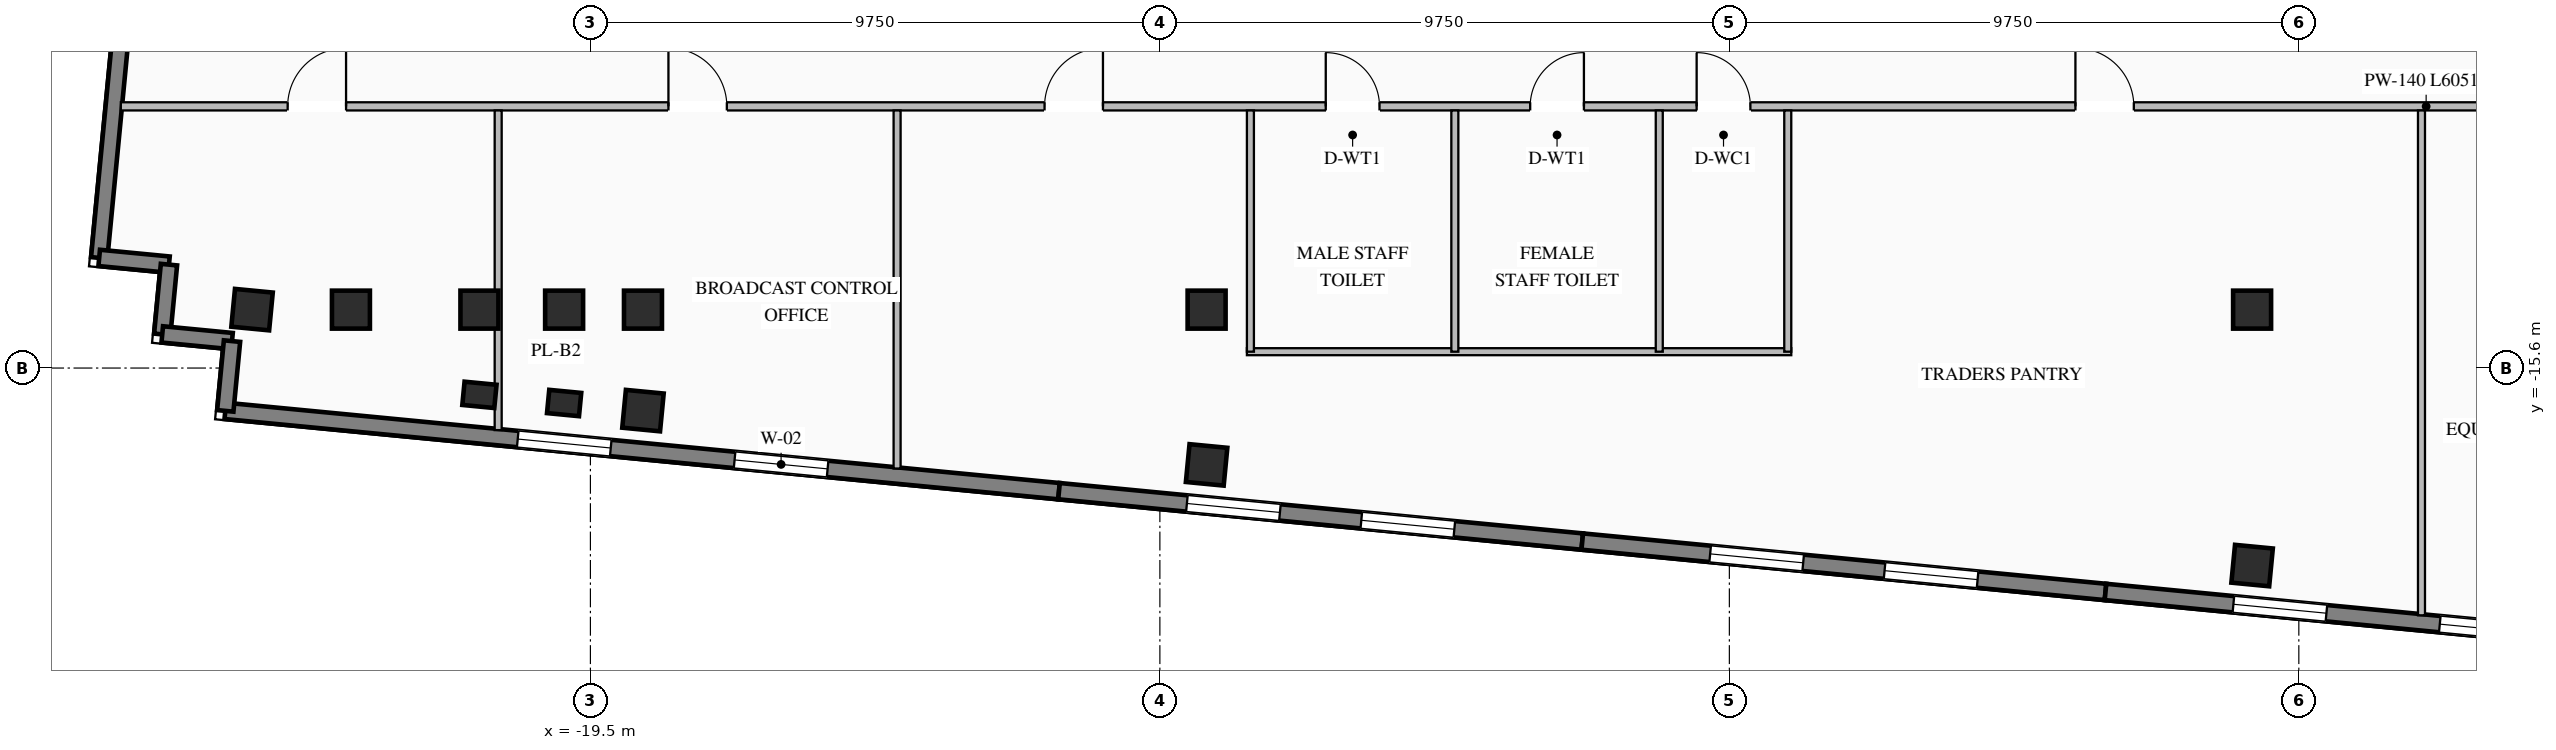
"""IFC4 building model, lengths in metres.
Left out: names, types, materials, properties, quantities, classifications, styles, units other than length and angle.
Written with IfcOpenShell. Run it as: python <this file> out.ifc"""

import sys

from ifc_helpers import new_model, si_unit, direction, frame, frame_2d, origin, origin_2d, place, context, subcontext, project, spatial, rectangle, i_section, extrude, element, fill, save


model = new_model("IFC4")
c1 = context("Model", 3, precision=1e-05, world=origin(), true_north=direction((0.0, 1.0)))
c2 = subcontext(c1, "Body", "Model", "MODEL_VIEW")
j1 = project(units=[si_unit("LENGTHUNIT", "METRE"), si_unit("PLANEANGLEUNIT", "RADIAN")], contexts=[c1])
p1 = place(None, origin())
s1 = spatial("IfcSite", under=j1, at=p1, CompositionType="ELEMENT")
p2 = place(p1, origin())
s2 = spatial("IfcBuilding", under=s1, at=p2, CompositionType="ELEMENT")
p3 = place(p2, frame((0.0, 0.0, 181.1)))
s3 = spatial("IfcBuildingStorey", under=s2, at=p3, CompositionType="ELEMENT", Elevation=181.1)
for number, where, z_axis, x_axis in (
    (1, (-21.4, -14.6, 0.0), (0.0, 0.0, 1.0), (1.0, 0.0, 0.0)),
    (2, (-19.95, -14.6, 0.0), (0.0, 0.0, 1.0), (1.0, 0.0, 0.0)),
    (3, (-18.6, -14.6, 0.0), (0.0, 0.0, 1.0), (1.0, 0.0, 0.0)),
    (4, (-8.95, -14.6, 0.0), (0.0, 0.0, 1.0), (1.0, 0.0, 0.0)),
    (5, (8.95, -14.6, 0.0), (0.0, 0.0, 1.0), (1.0, 0.0, 0.0)),
    (6, (-23.6, -14.6, 0.0), (0.0, 0.0, 1.0), (1.0, 0.0, 0.0)),
    (7, (-18.6, -16.329, 0.0), (0.0, 0.0, 1.0), (0.995, -0.096, 0.0)),
    (8, (-8.95, -17.258, 0.0), (0.0, 0.0, 1.0), (0.995, -0.096, 0.0)),
    (9, (8.95, -18.981, 0.0), (0.0, 0.0, 1.0), (0.995, -0.096, 0.0)),
    (10, (-25.293, -14.6, 0.0), (0.0, 0.0, 1.0), (0.995, -0.096, 0.0)),
):
    element("IfcColumn", number, at=place(p3, frame(where, z_axis=z_axis, x_axis=x_axis)), inside=s3, PredefinedType="COLUMN", context=c2, shape_type="SweptSolid", body=[
        extrude(i_section(OverallWidth=0.65, OverallDepth=0.65, WebThickness=0.028, FlangeThickness=0.04, at=origin_2d()), origin(), (0.0, 0.0, 1.0), 3.45),
    ])
for number, where, z_axis, x_axis in (
    (11, (-21.4, -16.059, 0.0), (0.0, 0.0, 1.0), (0.995, -0.096, 0.0)),
    (12, (-19.95, -16.199, 0.0), (0.0, 0.0, 1.0), (0.995, -0.096, 0.0)),
):
    element("IfcColumn", number, at=place(p3, frame(where, z_axis=z_axis, x_axis=x_axis)), inside=s3, PredefinedType="PILASTER", context=c2, shape_type="SweptSolid", body=[
        extrude(rectangle(XDim=0.55, YDim=0.4, at=origin_2d()), origin(), (0.0, 0.0, 1.0), 3.45),
    ])
p4 = place(p3, frame((-11.477, -17.708, 0.0), z_axis=(0.0, 0.0, 1.0), x_axis=(-0.995395762701, 0.095850276977, 0.0)))
e13 = element("IfcWall", 13, at=p4, inside=s3, PredefinedType="STANDARD", context=c2, shape_type="SweptSolid", body=[
    extrude(rectangle(XDim=14.34, YDim=0.28, at=frame_2d((7.17, 0.0))), origin(), (0.0, 0.0, 1.0), 3.25),
])
p5 = place(p4, frame((3.98, 0.0, 0.76)))
e14 = element("IfcOpeningElement", 14, at=p5, cuts=e13, PredefinedType="OPENING", context=c2, shape_type="SweptSolid", body=[
    extrude(rectangle(XDim=1.6, YDim=1.95, at=frame_2d((0.8, 0.975))), frame((0.0, 0.15, 0.0), z_axis=(0.0, -1.0, 0.0), x_axis=(1.0, 0.0, 0.0)), (0.0, 0.0, 1.0), 0.3),
])
p6 = place(p4, frame((7.71, 0.0, 0.76)))
e15 = element("IfcOpeningElement", 15, at=p6, cuts=e13, PredefinedType="OPENING", context=c2, shape_type="SweptSolid", body=[
    extrude(rectangle(XDim=1.6, YDim=1.95, at=frame_2d((0.8, 0.975))), frame((0.0, 0.15, 0.0), z_axis=(0.0, -1.0, 0.0), x_axis=(1.0, 0.0, 0.0)), (0.0, 0.0, 1.0), 0.3),
])
p7 = place(p3, frame((-2.519, -18.57, 0.0), z_axis=(0.0, 0.0, 1.0), x_axis=(-0.995396794462, 0.09583956164, 0.0)))
e16 = element("IfcWall", 16, at=p7, inside=s3, PredefinedType="STANDARD", context=c2, shape_type="SweptSolid", body=[
    extrude(rectangle(XDim=9.0, YDim=0.28, at=frame_2d((4.5, 0.0))), origin(), (0.0, 0.0, 1.0), 3.25),
])
p8 = place(p7, frame((2.2, 0.0, 0.76)))
e17 = element("IfcOpeningElement", 17, at=p8, cuts=e16, PredefinedType="OPENING", context=c2, shape_type="SweptSolid", body=[
    extrude(rectangle(XDim=1.6, YDim=1.95, at=frame_2d((0.8, 0.975))), frame((0.0, 0.15, 0.0), z_axis=(0.0, -1.0, 0.0), x_axis=(1.0, 0.0, 0.0)), (0.0, 0.0, 1.0), 0.3),
])
p9 = place(p7, frame((5.2, 0.0, 0.76)))
e18 = element("IfcOpeningElement", 18, at=p9, cuts=e16, PredefinedType="OPENING", context=c2, shape_type="SweptSolid", body=[
    extrude(rectangle(XDim=1.6, YDim=1.95, at=frame_2d((0.8, 0.975))), frame((0.0, 0.15, 0.0), z_axis=(0.0, -1.0, 0.0), x_axis=(1.0, 0.0, 0.0)), (0.0, 0.0, 1.0), 0.3),
])
p10 = place(p3, frame((6.44, -19.433, 0.0), z_axis=(0.0, 0.0, 1.0), x_axis=(-0.995396794462, 0.09583956164, 0.0)))
e19 = element("IfcWall", 19, at=p10, inside=s3, PredefinedType="STANDARD", context=c2, shape_type="SweptSolid", body=[
    extrude(rectangle(XDim=9.0, YDim=0.28, at=frame_2d((4.5, 0.0))), origin(), (0.0, 0.0, 1.0), 3.25),
])
p11 = place(p10, frame((2.2, 0.0, 0.76)))
e20 = element("IfcOpeningElement", 20, at=p11, cuts=e19, PredefinedType="OPENING", context=c2, shape_type="SweptSolid", body=[
    extrude(rectangle(XDim=1.6, YDim=1.95, at=frame_2d((0.8, 0.975))), frame((0.0, 0.15, 0.0), z_axis=(0.0, -1.0, 0.0), x_axis=(1.0, 0.0, 0.0)), (0.0, 0.0, 1.0), 0.3),
])
p12 = place(p10, frame((5.2, 0.0, 0.76)))
e21 = element("IfcOpeningElement", 21, at=p12, cuts=e19, PredefinedType="OPENING", context=c2, shape_type="SweptSolid", body=[
    extrude(rectangle(XDim=1.6, YDim=1.95, at=frame_2d((0.8, 0.975))), frame((0.0, 0.15, 0.0), z_axis=(0.0, -1.0, 0.0), x_axis=(1.0, 0.0, 0.0)), (0.0, 0.0, 1.0), 0.3),
])
p13 = place(p3, frame((15.399, -20.296, 0.0), z_axis=(0.0, 0.0, 1.0), x_axis=(-0.995394455533, 0.09586385082, 0.0)))
e22 = element("IfcWall", 22, at=p13, inside=s3, PredefinedType="STANDARD", context=c2, shape_type="SweptSolid", body=[
    extrude(rectangle(XDim=9.0, YDim=0.28, at=frame_2d((4.5, 0.0))), origin(), (0.0, 0.0, 1.0), 3.25),
])
p14 = place(p13, frame((1.65, 0.0, 0.76)))
e23 = element("IfcOpeningElement", 23, at=p14, cuts=e22, PredefinedType="OPENING", context=c2, shape_type="SweptSolid", body=[
    extrude(rectangle(XDim=1.6, YDim=1.95, at=frame_2d((0.8, 0.975))), frame((0.0, 0.15, 0.0), z_axis=(0.0, -1.0, 0.0), x_axis=(1.0, 0.0, 0.0)), (0.0, 0.0, 1.0), 0.3),
])
p15 = place(p13, frame((5.2, 0.0, 0.76)))
e24 = element("IfcOpeningElement", 24, at=p15, cuts=e22, PredefinedType="OPENING", context=c2, shape_type="SweptSolid", body=[
    extrude(rectangle(XDim=1.6, YDim=1.95, at=frame_2d((0.8, 0.975))), frame((0.0, 0.15, 0.0), z_axis=(0.0, -1.0, 0.0), x_axis=(1.0, 0.0, 0.0)), (0.0, 0.0, 1.0), 0.3),
])
p16 = place(p3, frame((-27.91, -13.714, 0.0), z_axis=(0.0, 0.0, 1.0), x_axis=(0.095839027265, 0.995396845913, 0.0)))
e25 = element("IfcWall", 25, at=p16, inside=s3, PredefinedType="STANDARD", context=c2, shape_type="SweptSolid", body=[
    extrude(rectangle(XDim=16.79, YDim=0.28, at=frame_2d((8.395, 0.0))), origin(), (0.0, 0.0, 1.0), 3.25),
])
p17 = place(p16, frame((5.147, 0.0, 0.76)))
e26 = element("IfcOpeningElement", 26, at=p17, cuts=e25, PredefinedType="OPENING", context=c2, shape_type="SweptSolid", body=[
    extrude(rectangle(XDim=2.0, YDim=2.05, at=frame_2d((1.0, 1.025))), frame((0.0, 0.15, 0.0), z_axis=(0.0, -1.0, 0.0), x_axis=(1.0, 0.0, 0.0)), (0.0, 0.0, 1.0), 0.3),
])
p18 = place(p16, frame((9.643, 0.0, 0.76)))
e27 = element("IfcOpeningElement", 27, at=p18, cuts=e25, PredefinedType="OPENING", context=c2, shape_type="SweptSolid", body=[
    extrude(rectangle(XDim=2.0, YDim=2.05, at=frame_2d((1.0, 1.025))), frame((0.0, 0.15, 0.0), z_axis=(0.0, -1.0, 0.0), x_axis=(1.0, 0.0, 0.0)), (0.0, 0.0, 1.0), 0.3),
])
p19 = place(p3, frame((-27.91, -13.714, 0.0), z_axis=(0.0, 0.0, 1.0), x_axis=(0.995397091755, -0.095836473879, 0.0)))
e28 = element("IfcWall", 28, at=p19, inside=s3, PredefinedType="STANDARD", context=c2, shape_type="SweptSolid", body=[
    extrude(rectangle(XDim=1.2, YDim=0.28, at=frame_2d((0.6, 0.0))), origin(), (0.0, 0.0, 1.0), 3.25),
])
for number, where, z_axis, x_axis in (
    (29, (-26.716, -13.829, 0.0), (0.0, 0.0, 1.0), (-0.096, -0.995, 0.0)),
    (30, (-26.831, -15.024, 0.0), (0.0, 0.0, 1.0), (0.995, -0.096, 0.0)),
):
    element("IfcWall", number, at=place(p3, frame(where, z_axis=z_axis, x_axis=x_axis)), inside=s3, PredefinedType="STANDARD", context=c2, shape_type="SweptSolid", body=[
        extrude(rectangle(XDim=1.2, YDim=0.28, at=frame_2d((0.6, 0.0))), origin(), (0.0, 0.0, 1.0), 3.25),
    ])
p20 = place(p3, frame((-25.636, -15.139, 0.0), z_axis=(0.0, 0.0, 1.0), x_axis=(-0.096038073607, -0.995377661201, 0.0)))
e31 = element("IfcWall", 31, at=p20, inside=s3, PredefinedType="STANDARD", context=c2, shape_type="SweptSolid", body=[
    extrude(rectangle(XDim=1.2, YDim=0.28, at=frame_2d((0.6, 0.0))), origin(), (0.0, 0.0, 1.0), 3.25),
])
p21 = place(p3, frame((-27.54, -11.12, 0.0), z_axis=(0.0, 0.0, 1.0), x_axis=(1.0, 0.0, 0.0)))
e32 = element("IfcWall", 32, at=p21, inside=s3, PredefinedType="STANDARD", context=c2, shape_type="SweptSolid", body=[
    extrude(rectangle(XDim=60.519, YDim=0.14, at=frame_2d((30.259, 0.0))), origin(), (0.0, 0.0, 1.0), 3.25),
])
p22 = place(p21, frame((20.63, 0.0, 0.0)))
e33 = element("IfcOpeningElement", 33, at=p22, cuts=e32, PredefinedType="OPENING", context=c2, shape_type="SweptSolid", body=[
    extrude(rectangle(XDim=0.92, YDim=2.08, at=frame_2d((0.46, 1.04))), frame((0.0, 0.08, 0.0), z_axis=(0.0, -1.0, 0.0), x_axis=(1.0, 0.0, 0.0)), (0.0, 0.0, 1.0), 0.16),
])
p23 = place(p21, frame((24.13, 0.0, 0.0)))
e34 = element("IfcOpeningElement", 34, at=p23, cuts=e32, PredefinedType="OPENING", context=c2, shape_type="SweptSolid", body=[
    extrude(rectangle(XDim=0.92, YDim=2.08, at=frame_2d((0.46, 1.04))), frame((0.0, 0.08, 0.0), z_axis=(0.0, -1.0, 0.0), x_axis=(1.0, 0.0, 0.0)), (0.0, 0.0, 1.0), 0.16),
])
p24 = place(p21, frame((26.98, 0.0, 0.0)))
e35 = element("IfcOpeningElement", 35, at=p24, cuts=e32, PredefinedType="OPENING", context=c2, shape_type="SweptSolid", body=[
    extrude(rectangle(XDim=0.92, YDim=2.08, at=frame_2d((0.46, 1.04))), frame((0.0, 0.08, 0.0), z_axis=(0.0, -1.0, 0.0), x_axis=(1.0, 0.0, 0.0)), (0.0, 0.0, 1.0), 0.16),
])
p25 = place(p21, frame((2.856, 0.0, 0.0)))
e36 = element("IfcOpeningElement", 36, at=p25, cuts=e32, PredefinedType="OPENING", context=c2, shape_type="SweptSolid", body=[
    extrude(rectangle(XDim=1.0, YDim=2.08, at=frame_2d((0.5, 1.04))), frame((0.0, 0.08, 0.0), z_axis=(0.0, -1.0, 0.0), x_axis=(1.0, 0.0, 0.0)), (0.0, 0.0, 1.0), 0.16),
])
p26 = place(p21, frame((9.376, 0.0, 0.0)))
e37 = element("IfcOpeningElement", 37, at=p26, cuts=e32, PredefinedType="OPENING", context=c2, shape_type="SweptSolid", body=[
    extrude(rectangle(XDim=1.0, YDim=2.08, at=frame_2d((0.5, 1.04))), frame((0.0, 0.08, 0.0), z_axis=(0.0, -1.0, 0.0), x_axis=(1.0, 0.0, 0.0)), (0.0, 0.0, 1.0), 0.16),
])
p27 = place(p21, frame((15.815, 0.0, 0.0)))
e38 = element("IfcOpeningElement", 38, at=p27, cuts=e32, PredefinedType="OPENING", context=c2, shape_type="SweptSolid", body=[
    extrude(rectangle(XDim=1.0, YDim=2.08, at=frame_2d((0.5, 1.04))), frame((0.0, 0.08, 0.0), z_axis=(0.0, -1.0, 0.0), x_axis=(1.0, 0.0, 0.0)), (0.0, 0.0, 1.0), 0.16),
])
p28 = place(p21, frame((33.465, 0.0, 0.0)))
e39 = element("IfcOpeningElement", 39, at=p28, cuts=e32, PredefinedType="OPENING", context=c2, shape_type="SweptSolid", body=[
    extrude(rectangle(XDim=1.0, YDim=2.08, at=frame_2d((0.5, 1.04))), frame((0.0, 0.08, 0.0), z_axis=(0.0, -1.0, 0.0), x_axis=(1.0, 0.0, 0.0)), (0.0, 0.0, 1.0), 0.16),
])
p29 = place(p21, frame((44.474, 0.0, 0.0)))
e40 = element("IfcOpeningElement", 40, at=p29, cuts=e32, PredefinedType="OPENING", context=c2, shape_type="SweptSolid", body=[
    extrude(rectangle(XDim=1.0, YDim=2.08, at=frame_2d((0.5, 1.04))), frame((0.0, 0.08, 0.0), z_axis=(0.0, -1.0, 0.0), x_axis=(1.0, 0.0, 0.0)), (0.0, 0.0, 1.0), 0.16),
])
p30 = place(p21, frame((54.913, 0.0, 0.0)))
e41 = element("IfcOpeningElement", 41, at=p30, cuts=e32, PredefinedType="OPENING", context=c2, shape_type="SweptSolid", body=[
    extrude(rectangle(XDim=1.0, YDim=2.08, at=frame_2d((0.5, 1.04))), frame((0.0, 0.08, 0.0), z_axis=(0.0, -1.0, 0.0), x_axis=(1.0, 0.0, 0.0)), (0.0, 0.0, 1.0), 0.16),
])
p31 = place(p3, frame((-8.26, -15.32, 0.0), z_axis=(0.0, 0.0, 1.0), x_axis=(1.0, 0.0, 0.0)))
e42 = element("IfcWall", 42, at=p31, inside=s3, PredefinedType="STANDARD", context=c2, shape_type="SweptSolid", body=[
    extrude(rectangle(XDim=9.32, YDim=0.12, at=frame_2d((4.66, 0.0))), origin(), (0.0, 0.0, 1.0), 3.25),
])
for number, where, z_axis, x_axis in (
    (43, (-8.2, -15.32, 0.0), (0.0, 0.0, 1.0), (0.0, 1.0, 0.0)),
    (44, (-4.7, -15.32, 0.0), (0.0, 0.0, 1.0), (0.0, 1.0, 0.0)),
    (45, (-1.2, -15.32, 0.0), (0.0, 0.0, 1.0), (0.0, 1.0, 0.0)),
    (46, (1.0, -15.32, 0.0), (0.0, 0.0, 1.0), (0.0, 1.0, 0.0)),
):
    element("IfcWall", number, at=place(p3, frame(where, z_axis=z_axis, x_axis=x_axis)), inside=s3, PredefinedType="STANDARD", context=c2, shape_type="SweptSolid", body=[
        extrude(rectangle(XDim=4.13, YDim=0.12, at=frame_2d((2.065, 0.0))), origin(), (0.0, 0.0, 1.0), 3.25),
    ])
p32 = place(p3, frame((-21.079, -16.663, 0.0), z_axis=(0.0, 0.0, 1.0), x_axis=(0.0, 1.0, 0.0)))
e47 = element("IfcWall", 47, at=p32, inside=s3, PredefinedType="STANDARD", context=c2, shape_type="SweptSolid", body=[
    extrude(rectangle(XDim=5.473, YDim=0.12, at=frame_2d((2.736, 0.0))), origin(), (0.0, 0.0, 1.0), 3.25),
])
p33 = place(p3, frame((-14.249, -17.32, 0.0), z_axis=(0.0, 0.0, 1.0), x_axis=(0.0, 1.0, 0.0)))
e48 = element("IfcWall", 48, at=p33, inside=s3, PredefinedType="STANDARD", context=c2, shape_type="SweptSolid", body=[
    extrude(rectangle(XDim=6.13, YDim=0.12, at=frame_2d((3.065, 0.0))), origin(), (0.0, 0.0, 1.0), 3.25),
])
p34 = place(p3, frame((11.85, -19.833, 0.0), z_axis=(0.0, 0.0, 1.0), x_axis=(0.0, 1.0, 0.0)))
e49 = element("IfcWall", 49, at=p34, inside=s3, PredefinedType="STANDARD", context=c2, shape_type="SweptSolid", body=[
    extrude(rectangle(XDim=8.643, YDim=0.12, at=frame_2d((4.322, 0.0))), origin(), (0.0, 0.0, 1.0), 3.25),
])
p35 = place(p5, origin())
e50 = element("IfcWindow", 50, at=p35, inside=s3, PartitioningType="SINGLE_PANEL", PredefinedType="WINDOW", context=c2, shape_type="SweptSolid", body=[
    extrude(rectangle(XDim=1.6, YDim=1.95, at=frame_2d((0.8, 0.975))), frame((0.0, 0.03, 0.0), z_axis=(0.0, -1.0, 0.0), x_axis=(1.0, 0.0, 0.0)), (0.0, 0.0, 1.0), 0.06),
])
fill(e14, e50)
p36 = place(p6, origin())
e51 = element("IfcWindow", 51, at=p36, inside=s3, PartitioningType="SINGLE_PANEL", PredefinedType="WINDOW", context=c2, shape_type="SweptSolid", body=[
    extrude(rectangle(XDim=1.6, YDim=1.95, at=frame_2d((0.8, 0.975))), frame((0.0, 0.03, 0.0), z_axis=(0.0, -1.0, 0.0), x_axis=(1.0, 0.0, 0.0)), (0.0, 0.0, 1.0), 0.06),
])
fill(e15, e51)
p37 = place(p8, origin())
e52 = element("IfcWindow", 52, at=p37, inside=s3, PartitioningType="SINGLE_PANEL", PredefinedType="WINDOW", context=c2, shape_type="SweptSolid", body=[
    extrude(rectangle(XDim=1.6, YDim=1.95, at=frame_2d((0.8, 0.975))), frame((0.0, 0.03, 0.0), z_axis=(0.0, -1.0, 0.0), x_axis=(1.0, 0.0, 0.0)), (0.0, 0.0, 1.0), 0.06),
])
fill(e17, e52)
p38 = place(p9, origin())
e53 = element("IfcWindow", 53, at=p38, inside=s3, PartitioningType="SINGLE_PANEL", PredefinedType="WINDOW", context=c2, shape_type="SweptSolid", body=[
    extrude(rectangle(XDim=1.6, YDim=1.95, at=frame_2d((0.8, 0.975))), frame((0.0, 0.03, 0.0), z_axis=(0.0, -1.0, 0.0), x_axis=(1.0, 0.0, 0.0)), (0.0, 0.0, 1.0), 0.06),
])
fill(e18, e53)
p39 = place(p11, origin())
e54 = element("IfcWindow", 54, at=p39, inside=s3, PartitioningType="SINGLE_PANEL", PredefinedType="WINDOW", context=c2, shape_type="SweptSolid", body=[
    extrude(rectangle(XDim=1.6, YDim=1.95, at=frame_2d((0.8, 0.975))), frame((0.0, 0.03, 0.0), z_axis=(0.0, -1.0, 0.0), x_axis=(1.0, 0.0, 0.0)), (0.0, 0.0, 1.0), 0.06),
])
fill(e20, e54)
p40 = place(p12, origin())
e55 = element("IfcWindow", 55, at=p40, inside=s3, PartitioningType="SINGLE_PANEL", PredefinedType="WINDOW", context=c2, shape_type="SweptSolid", body=[
    extrude(rectangle(XDim=1.6, YDim=1.95, at=frame_2d((0.8, 0.975))), frame((0.0, 0.03, 0.0), z_axis=(0.0, -1.0, 0.0), x_axis=(1.0, 0.0, 0.0)), (0.0, 0.0, 1.0), 0.06),
])
fill(e21, e55)
p41 = place(p14, origin())
e56 = element("IfcWindow", 56, at=p41, inside=s3, PartitioningType="SINGLE_PANEL", PredefinedType="WINDOW", context=c2, shape_type="SweptSolid", body=[
    extrude(rectangle(XDim=1.6, YDim=1.95, at=frame_2d((0.8, 0.975))), frame((0.0, 0.03, 0.0), z_axis=(0.0, -1.0, 0.0), x_axis=(1.0, 0.0, 0.0)), (0.0, 0.0, 1.0), 0.06),
])
fill(e23, e56)
p42 = place(p15, origin())
e57 = element("IfcWindow", 57, at=p42, inside=s3, PartitioningType="SINGLE_PANEL", PredefinedType="WINDOW", context=c2, shape_type="SweptSolid", body=[
    extrude(rectangle(XDim=1.6, YDim=1.95, at=frame_2d((0.8, 0.975))), frame((0.0, 0.03, 0.0), z_axis=(0.0, -1.0, 0.0), x_axis=(1.0, 0.0, 0.0)), (0.0, 0.0, 1.0), 0.06),
])
fill(e24, e57)
p43 = place(p22, origin())
e58 = element("IfcDoor", 58, at=p43, inside=s3, OperationType="SINGLE_SWING_LEFT", PredefinedType="DOOR", context=c2, shape_type="SweptSolid", body=[
    extrude(rectangle(XDim=0.92, YDim=2.08, at=frame_2d((0.46, 1.04))), frame((0.0, 0.025, 0.0), z_axis=(0.0, -1.0, 0.0), x_axis=(1.0, 0.0, 0.0)), (0.0, 0.0, 1.0), 0.05),
])
fill(e33, e58)
p44 = place(p23, origin())
e59 = element("IfcDoor", 59, at=p44, inside=s3, OperationType="SINGLE_SWING_RIGHT", PredefinedType="DOOR", context=c2, shape_type="SweptSolid", body=[
    extrude(rectangle(XDim=0.92, YDim=2.08, at=frame_2d((0.46, 1.04))), frame((0.0, 0.025, 0.0), z_axis=(0.0, -1.0, 0.0), x_axis=(1.0, 0.0, 0.0)), (0.0, 0.0, 1.0), 0.05),
])
fill(e34, e59)
p45 = place(p24, origin())
e60 = element("IfcDoor", 60, at=p45, inside=s3, OperationType="SINGLE_SWING_LEFT", PredefinedType="DOOR", context=c2, shape_type="SweptSolid", body=[
    extrude(rectangle(XDim=0.92, YDim=2.08, at=frame_2d((0.46, 1.04))), frame((0.0, 0.025, 0.0), z_axis=(0.0, -1.0, 0.0), x_axis=(1.0, 0.0, 0.0)), (0.0, 0.0, 1.0), 0.05),
])
fill(e35, e60)
p46 = place(p25, origin())
e61 = element("IfcDoor", 61, at=p46, inside=s3, OperationType="SINGLE_SWING_RIGHT", PredefinedType="DOOR", context=c2, shape_type="SweptSolid", body=[
    extrude(rectangle(XDim=1.0, YDim=2.08, at=frame_2d((0.5, 1.04))), frame((0.0, 0.025, 0.0), z_axis=(0.0, -1.0, 0.0), x_axis=(1.0, 0.0, 0.0)), (0.0, 0.0, 1.0), 0.05),
])
fill(e36, e61)
p47 = place(p26, origin())
e62 = element("IfcDoor", 62, at=p47, inside=s3, OperationType="SINGLE_SWING_LEFT", PredefinedType="DOOR", context=c2, shape_type="SweptSolid", body=[
    extrude(rectangle(XDim=1.0, YDim=2.08, at=frame_2d((0.5, 1.04))), frame((0.0, 0.025, 0.0), z_axis=(0.0, -1.0, 0.0), x_axis=(1.0, 0.0, 0.0)), (0.0, 0.0, 1.0), 0.05),
])
fill(e37, e62)
p48 = place(p27, origin())
e63 = element("IfcDoor", 63, at=p48, inside=s3, OperationType="SINGLE_SWING_RIGHT", PredefinedType="DOOR", context=c2, shape_type="SweptSolid", body=[
    extrude(rectangle(XDim=1.0, YDim=2.08, at=frame_2d((0.5, 1.04))), frame((0.0, 0.025, 0.0), z_axis=(0.0, -1.0, 0.0), x_axis=(1.0, 0.0, 0.0)), (0.0, 0.0, 1.0), 0.05),
])
fill(e38, e63)
p49 = place(p28, origin())
e64 = element("IfcDoor", 64, at=p49, inside=s3, OperationType="SINGLE_SWING_LEFT", PredefinedType="DOOR", context=c2, shape_type="SweptSolid", body=[
    extrude(rectangle(XDim=1.0, YDim=2.08, at=frame_2d((0.5, 1.04))), frame((0.0, 0.025, 0.0), z_axis=(0.0, -1.0, 0.0), x_axis=(1.0, 0.0, 0.0)), (0.0, 0.0, 1.0), 0.05),
])
fill(e39, e64)
save(model, sys.argv[1])
